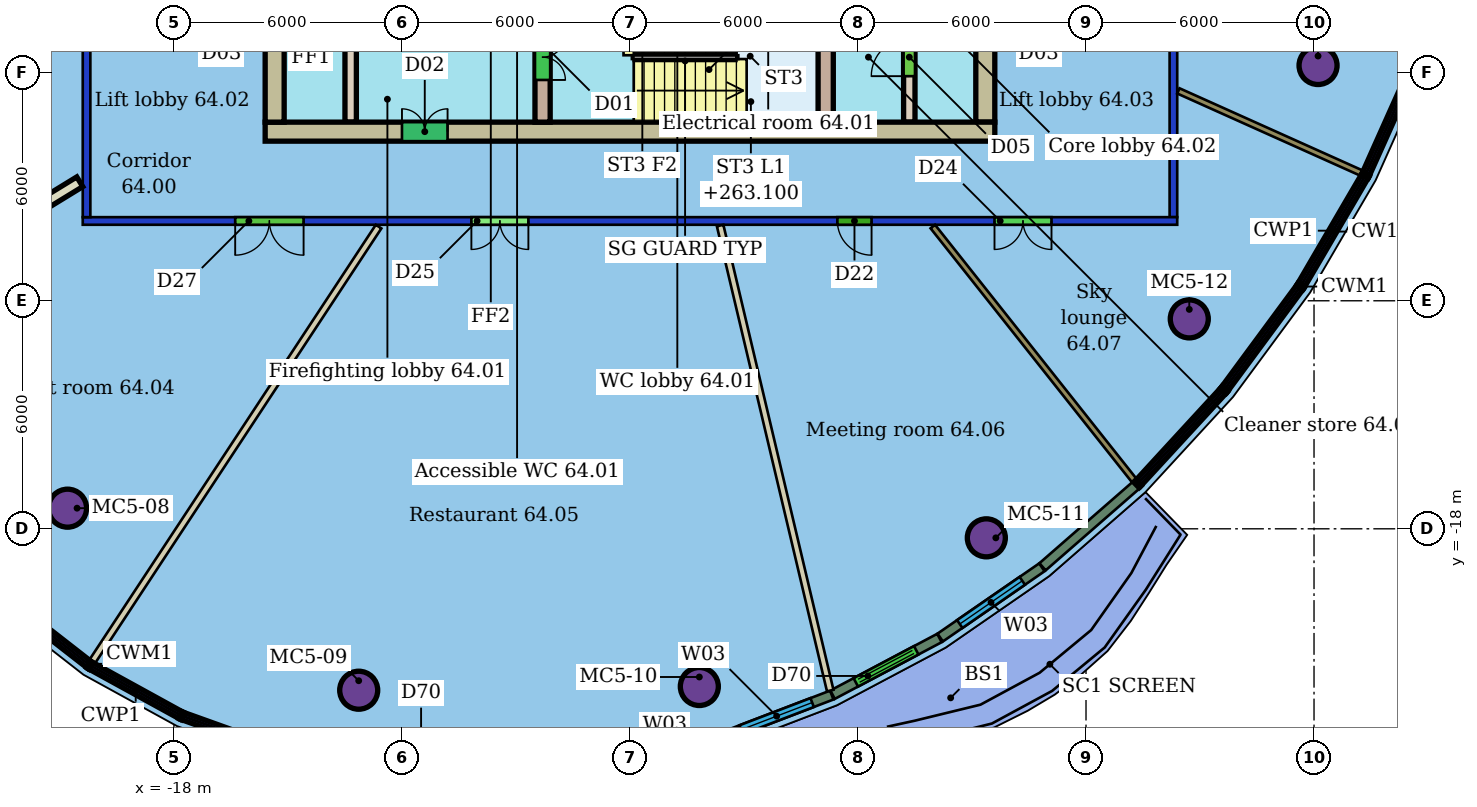
"""IFC4 building model, lengths in metres.
Left out: names, types, materials, properties, quantities, classifications, styles, units other than length and angle.
Written with IfcOpenShell. Run it as: python <this file> out.ifc"""

import sys

from ifc_helpers import new_model, si_unit, direction, frame, frame_2d, origin, origin_2d, place, context, subcontext, project, spatial, rectangle, hollow_circle, extrude, element, fill, save


model = new_model("IFC4")
c1 = context("Model", 3, precision=1e-05, world=origin(), true_north=direction((0.0, 1.0)))
c2 = subcontext(c1, "Body", "Model", "MODEL_VIEW")
j1 = project(units=[si_unit("LENGTHUNIT", "METRE"), si_unit("PLANEANGLEUNIT", "RADIAN")], contexts=[c1])
p1 = place(None, origin())
s1 = spatial("IfcSite", under=j1, at=p1, CompositionType="ELEMENT")
p2 = place(p1, origin())
s2 = spatial("IfcBuilding", under=s1, at=p2, CompositionType="ELEMENT")
p3 = place(p2, frame((0.0, 0.0, 261.3)))
s3 = spatial("IfcBuildingStorey", under=s2, at=p3, CompositionType="ELEMENT", Elevation=261.3)
for number, where, z_axis, x_axis in (
    (1, (-20.8, -17.457, 0.0), (0.0, 0.0, 1.0), (1.0, 0.0, 0.0)),
    (2, (-13.138, -22.247, 0.0), (0.0, 0.0, 1.0), (1.0, 0.0, 0.0)),
    (3, (-4.175, -22.149, 0.0), (0.0, 0.0, 1.0), (1.0, 0.0, 0.0)),
    (4, (3.377, -18.238, 0.0), (0.0, 0.0, 1.0), (1.0, 0.0, 0.0)),
    (5, (8.718, -12.477, 0.0), (0.0, 0.0, 1.0), (1.0, 0.0, 0.0)),
    (6, (12.106, -5.81, 0.0), (0.0, 0.0, 1.0), (1.0, 0.0, 0.0)),
):
    element("IfcColumn", number, at=place(p3, frame(where, z_axis=z_axis, x_axis=x_axis)), inside=s3, PredefinedType="COLUMN", context=c2, shape_type="SweptSolid", body=[
        extrude(hollow_circle(Radius=0.5, WallThickness=0.04, at=origin_2d()), origin(), (0.0, 0.0, 1.0), 3.45),
    ])
p4 = place(p3, frame((8.4, -9.9, 0.0), z_axis=(0.0, 0.0, 1.0), x_axis=(-1.0, 0.0, 0.0)))
e7 = element("IfcWall", 7, at=p4, inside=s3, PredefinedType="PARTITIONING", context=c2, shape_type="SweptSolid", body=[
    extrude(rectangle(XDim=28.8, YDim=0.2, at=frame_2d((14.4, 0.0))), origin(), (0.0, 0.0, 1.0), 3.1),
])
p5 = place(p4, frame((22.989, 0.0, 0.0)))
e8 = element("IfcOpeningElement", 8, at=p5, cuts=e7, PredefinedType="OPENING", context=c2, shape_type="SweptSolid", body=[
    extrude(rectangle(XDim=1.8, YDim=2.4, at=frame_2d((0.9, 1.2))), frame((0.0, 0.11, 0.0), z_axis=(0.0, -1.0, 0.0), x_axis=(1.0, 0.0, 0.0)), (0.0, 0.0, 1.0), 0.22),
])
p6 = place(p4, frame((17.073, 0.0, 0.0)))
e9 = element("IfcOpeningElement", 9, at=p6, cuts=e7, PredefinedType="OPENING", context=c2, shape_type="SweptSolid", body=[
    extrude(rectangle(XDim=1.5, YDim=2.4, at=frame_2d((0.75, 1.2))), frame((0.0, 0.11, 0.0), z_axis=(0.0, -1.0, 0.0), x_axis=(1.0, 0.0, 0.0)), (0.0, 0.0, 1.0), 0.22),
])
p7 = place(p4, frame((8.043, 0.0, 0.0)))
e10 = element("IfcOpeningElement", 10, at=p7, cuts=e7, PredefinedType="OPENING", context=c2, shape_type="SweptSolid", body=[
    extrude(rectangle(XDim=0.9, YDim=2.1, at=frame_2d((0.45, 1.05))), frame((0.0, 0.11, 0.0), z_axis=(0.0, -1.0, 0.0), x_axis=(1.0, 0.0, 0.0)), (0.0, 0.0, 1.0), 0.22),
])
p8 = place(p4, frame((3.308, 0.0, 0.0)))
e11 = element("IfcOpeningElement", 11, at=p8, cuts=e7, PredefinedType="OPENING", context=c2, shape_type="SweptSolid", body=[
    extrude(rectangle(XDim=1.5, YDim=2.1, at=frame_2d((0.75, 1.05))), frame((0.0, 0.11, 0.0), z_axis=(0.0, -1.0, 0.0), x_axis=(1.0, 0.0, 0.0)), (0.0, 0.0, 1.0), 0.22),
])
p9 = place(p3, frame((-20.3, -9.8, 0.0), z_axis=(0.0, 0.0, 1.0), x_axis=(0.0, 1.0, 0.0)))
e12 = element("IfcWall", 12, at=p9, inside=s3, PredefinedType="PARTITIONING", context=c2, shape_type="SweptSolid", body=[
    extrude(rectangle(XDim=19.6, YDim=0.2, at=frame_2d((9.8, 0.0))), origin(), (0.0, 0.0, 1.0), 3.1),
])
p10 = place(p9, frame((13.678, 0.0, 0.0)))
e13 = element("IfcOpeningElement", 13, at=p10, cuts=e12, PredefinedType="OPENING", context=c2, shape_type="SweptSolid", body=[
    extrude(rectangle(XDim=1.5, YDim=2.1, at=frame_2d((0.75, 1.05))), frame((0.0, 0.11, 0.0), z_axis=(0.0, -1.0, 0.0), x_axis=(1.0, 0.0, 0.0)), (0.0, 0.0, 1.0), 0.22),
])
p11 = place(p9, frame((6.822, 0.0, 0.0)))
e14 = element("IfcOpeningElement", 14, at=p11, cuts=e12, PredefinedType="OPENING", context=c2, shape_type="SweptSolid", body=[
    extrude(rectangle(XDim=1.8, YDim=2.4, at=frame_2d((0.9, 1.2))), frame((0.0, 0.11, 0.0), z_axis=(0.0, -1.0, 0.0), x_axis=(1.0, 0.0, 0.0)), (0.0, 0.0, 1.0), 0.22),
])
p12 = place(p3, frame((8.3, 9.8, 0.0), z_axis=(0.0, 0.0, 1.0), x_axis=(0.0, -1.0, 0.0)))
e15 = element("IfcWall", 15, at=p12, inside=s3, PredefinedType="PARTITIONING", context=c2, shape_type="SweptSolid", body=[
    extrude(rectangle(XDim=19.6, YDim=0.2, at=frame_2d((9.8, 0.0))), origin(), (0.0, 0.0, 1.0), 3.1),
])
p13 = place(p12, frame((9.889, 0.0, 0.0)))
e16 = element("IfcOpeningElement", 16, at=p13, cuts=e15, PredefinedType="OPENING", context=c2, shape_type="SweptSolid", body=[
    extrude(rectangle(XDim=1.8, YDim=2.1, at=frame_2d((0.9, 1.05))), frame((0.0, 0.11, 0.0), z_axis=(0.0, -1.0, 0.0), x_axis=(1.0, 0.0, 0.0)), (0.0, 0.0, 1.0), 0.22),
])
p14 = place(p3, frame((-27.006, -12.867, 0.0), z_axis=(0.0, 0.0, 1.0), x_axis=(0.852737367146, 0.522339911047, 0.0)))
e17 = element("IfcWall", 17, at=p14, inside=s3, PredefinedType="PARTITIONING", context=c2, shape_type="SweptSolid", body=[
    extrude(rectangle(XDim=7.655, YDim=0.3, at=frame_2d((3.827, 0.0))), origin(), (0.0, 0.0, 1.0), 3.45),
])
p15 = place(p3, frame((-20.146, -21.485, 0.0), z_axis=(0.0, 0.0, 1.0), x_axis=(0.549897752102, 0.835231981089, 0.0)))
e18 = element("IfcWall", 18, at=p15, inside=s3, PredefinedType="PARTITIONING", context=c2, shape_type="SweptSolid", body=[
    extrude(rectangle(XDim=13.694, YDim=0.175, at=frame_2d((6.847, 0.0))), origin(), (0.0, 0.0, 1.0), 3.45),
])
p16 = place(p3, frame((-0.731, -22.257, 0.0), z_axis=(0.0, 0.0, 1.0), x_axis=(-0.23038317053, 0.973099992157, 0.0)))
e19 = element("IfcWall", 19, at=p16, inside=s3, PredefinedType="PARTITIONING", context=c2, shape_type="SweptSolid", body=[
    extrude(rectangle(XDim=12.574, YDim=0.175, at=frame_2d((6.287, 0.0))), origin(), (0.0, 0.0, 1.0), 3.45),
])
p17 = place(p3, frame((7.269, -16.73, 0.0), z_axis=(0.0, 0.0, 1.0), x_axis=(-0.62140501057, 0.783489510356, 0.0)))
e20 = element("IfcWall", 20, at=p17, inside=s3, PredefinedType="PARTITIONING", context=c2, shape_type="SweptSolid", body=[
    extrude(rectangle(XDim=8.53, YDim=0.15, at=frame_2d((4.265, 0.0))), origin(), (0.0, 0.0, 1.0), 3.45),
])
p18 = place(p3, frame((13.243, -8.637, 0.0), z_axis=(0.0, 0.0, 1.0), x_axis=(-0.912328117743, 0.409459894954, 0.0)))
e21 = element("IfcWall", 21, at=p18, inside=s3, PredefinedType="PARTITIONING", context=c2, shape_type="SweptSolid", body=[
    extrude(rectangle(XDim=5.274, YDim=0.15, at=frame_2d((2.637, 0.0))), origin(), (0.0, 0.0, 1.0), 3.45),
])
p19 = place(p3, frame((-3.591, -23.484, 0.0), z_axis=(0.0, 0.0, 1.0), x_axis=(0.93395615703, 0.357387600156, 0.0)))
e22 = element("IfcWall", 22, at=p19, inside=s3, PredefinedType="SOLIDWALL", context=c2, shape_type="SweptSolid", body=[
    extrude(rectangle(XDim=3.105, YDim=0.25, at=frame_2d((1.553, 0.0))), origin(), (0.0, 0.0, 1.0), 3.15),
])
p20 = place(p19, frame((0.553, 0.0, 0.9)))
e23 = element("IfcOpeningElement", 23, at=p20, cuts=e22, PredefinedType="OPENING", context=c2, shape_type="SweptSolid", body=[
    extrude(rectangle(XDim=2.0, YDim=2.1, at=frame_2d((1.0, 1.05))), frame((0.0, 0.135, 0.0), z_axis=(0.0, -1.0, 0.0), x_axis=(1.0, 0.0, 0.0)), (0.0, 0.0, 1.0), 0.27),
])
p21 = place(p3, frame((-0.669, -22.365, 0.0), z_axis=(0.0, 0.0, 1.0), x_axis=(0.883433244898, 0.468557042216, 0.0)))
e24 = element("IfcWall", 24, at=p21, inside=s3, PredefinedType="SOLIDWALL", context=c2, shape_type="SweptSolid", body=[
    extrude(rectangle(XDim=3.184, YDim=0.25, at=frame_2d((1.592, 0.0))), origin(), (0.0, 0.0, 1.0), 3.15),
])
p22 = place(p21, frame((0.692, 0.0, 0.0)))
e25 = element("IfcOpeningElement", 25, at=p22, cuts=e24, PredefinedType="OPENING", context=c2, shape_type="SweptSolid", body=[
    extrude(rectangle(XDim=1.8, YDim=2.4, at=frame_2d((0.9, 1.2))), frame((0.0, 0.135, 0.0), z_axis=(0.0, -1.0, 0.0), x_axis=(1.0, 0.0, 0.0)), (0.0, 0.0, 1.0), 0.27),
])
p23 = place(p3, frame((2.163, -20.862, 0.0), z_axis=(0.0, 0.0, 1.0), x_axis=(0.822813315807, 0.568311751885, 0.0)))
e26 = element("IfcWall", 26, at=p23, inside=s3, PredefinedType="SOLIDWALL", context=c2, shape_type="SweptSolid", body=[
    extrude(rectangle(XDim=3.252, YDim=0.25, at=frame_2d((1.626, 0.0))), origin(), (0.0, 0.0, 1.0), 3.15),
])
p24 = place(p23, frame((0.626, 0.0, 0.9)))
e27 = element("IfcOpeningElement", 27, at=p24, cuts=e26, PredefinedType="OPENING", context=c2, shape_type="SweptSolid", body=[
    extrude(rectangle(XDim=2.0, YDim=2.1, at=frame_2d((1.0, 1.05))), frame((0.0, 0.135, 0.0), z_axis=(0.0, -1.0, 0.0), x_axis=(1.0, 0.0, 0.0)), (0.0, 0.0, 1.0), 0.27),
])
p25 = place(p3, frame((4.856, -19.0, 0.0), z_axis=(0.0, 0.0, 1.0), x_axis=(0.753618743279, 0.657311790385, 0.0)))
e28 = element("IfcWall", 28, at=p25, inside=s3, PredefinedType="SOLIDWALL", context=c2, shape_type="SweptSolid", body=[
    extrude(rectangle(XDim=3.263, YDim=0.25, at=frame_2d((1.631, 0.0))), origin(), (0.0, 0.0, 1.0), 3.15),
])
p26 = place(p3, frame((-15.6, -7.55, 0.0), z_axis=(0.0, 0.0, 1.0), x_axis=(1.0, 0.0, 0.0)))
e29 = element("IfcWall", 29, at=p26, inside=s3, PredefinedType="SHEAR", context=c2, shape_type="SweptSolid", body=[
    extrude(rectangle(XDim=19.2, YDim=0.5, at=frame_2d((9.6, 0.0))), origin(), (0.0, 0.0, 1.0), 3.3),
])
p27 = place(p26, frame((3.6, 0.0, 0.0)))
e30 = element("IfcOpeningElement", 30, at=p27, cuts=e29, PredefinedType="OPENING", context=c2, shape_type="SweptSolid", body=[
    extrude(rectangle(XDim=1.2, YDim=2.1, at=frame_2d((0.6, 1.05))), frame((0.0, 0.26, 0.0), z_axis=(0.0, -1.0, 0.0), x_axis=(1.0, 0.0, 0.0)), (0.0, 0.0, 1.0), 0.52),
])
p28 = place(p3, frame((-15.35, 7.3, 0.0), z_axis=(0.0, 0.0, 1.0), x_axis=(0.0, -1.0, 0.0)))
e31 = element("IfcWall", 31, at=p28, inside=s3, PredefinedType="SHEAR", context=c2, shape_type="SweptSolid", body=[
    extrude(rectangle(XDim=14.6, YDim=0.5, at=frame_2d((7.3, 0.0))), origin(), (0.0, 0.0, 1.0), 3.3),
])
p29 = place(p28, frame((10.6, 0.0, 0.0)))
e32 = element("IfcOpeningElement", 32, at=p29, cuts=e31, PredefinedType="OPENING", context=c2, shape_type="SweptSolid", body=[
    extrude(rectangle(XDim=1.2, YDim=2.1, at=frame_2d((0.6, 1.05))), frame((0.0, 0.26, 0.0), z_axis=(0.0, -1.0, 0.0), x_axis=(1.0, 0.0, 0.0)), (0.0, 0.0, 1.0), 0.52),
])
p30 = place(p28, frame((2.8, 0.0, 0.0)))
e33 = element("IfcOpeningElement", 33, at=p30, cuts=e31, PredefinedType="OPENING", context=c2, shape_type="SweptSolid", body=[
    extrude(rectangle(XDim=1.2, YDim=2.1, at=frame_2d((0.6, 1.05))), frame((0.0, 0.26, 0.0), z_axis=(0.0, -1.0, 0.0), x_axis=(1.0, 0.0, 0.0)), (0.0, 0.0, 1.0), 0.52),
])
p31 = place(p3, frame((3.35, -7.3, 0.0), z_axis=(0.0, 0.0, 1.0), x_axis=(0.0, 1.0, 0.0)))
e34 = element("IfcWall", 34, at=p31, inside=s3, PredefinedType="SHEAR", context=c2, shape_type="SweptSolid", body=[
    extrude(rectangle(XDim=14.6, YDim=0.5, at=frame_2d((7.3, 0.0))), origin(), (0.0, 0.0, 1.0), 3.3),
])
p32 = place(p31, frame((2.8, 0.0, 0.0)))
e35 = element("IfcOpeningElement", 35, at=p32, cuts=e34, PredefinedType="OPENING", context=c2, shape_type="SweptSolid", body=[
    extrude(rectangle(XDim=1.2, YDim=2.1, at=frame_2d((0.6, 1.05))), frame((0.0, 0.26, 0.0), z_axis=(0.0, -1.0, 0.0), x_axis=(1.0, 0.0, 0.0)), (0.0, 0.0, 1.0), 0.52),
])
p33 = place(p31, frame((10.6, 0.0, 0.0)))
e36 = element("IfcOpeningElement", 36, at=p33, cuts=e34, PredefinedType="OPENING", context=c2, shape_type="SweptSolid", body=[
    extrude(rectangle(XDim=1.2, YDim=2.1, at=frame_2d((0.6, 1.05))), frame((0.0, 0.26, 0.0), z_axis=(0.0, -1.0, 0.0), x_axis=(1.0, 0.0, 0.0)), (0.0, 0.0, 1.0), 0.52),
])
p34 = place(p3, frame((-13.35, 7.3, 0.0), z_axis=(0.0, 0.0, 1.0), x_axis=(0.0, -1.0, 0.0)))
e37 = element("IfcWall", 37, at=p34, inside=s3, PredefinedType="SHEAR", context=c2, shape_type="SweptSolid", body=[
    extrude(rectangle(XDim=14.6, YDim=0.3, at=frame_2d((7.3, 0.0))), origin(), (0.0, 0.0, 1.0), 3.3),
])
p35 = place(p34, frame((6.55, 0.0, 0.0)))
e38 = element("IfcOpeningElement", 38, at=p35, cuts=e37, PredefinedType="OPENING", context=c2, shape_type="SweptSolid", body=[
    extrude(rectangle(XDim=1.5, YDim=2.1, at=frame_2d((0.75, 1.05))), frame((0.0, 0.16, 0.0), z_axis=(0.0, -1.0, 0.0), x_axis=(1.0, 0.0, 0.0)), (0.0, 0.0, 1.0), 0.32),
])
p36 = place(p3, frame((1.35, -7.3, 0.0), z_axis=(0.0, 0.0, 1.0), x_axis=(0.0, 1.0, 0.0)))
e39 = element("IfcWall", 39, at=p36, inside=s3, PredefinedType="SHEAR", context=c2, shape_type="SweptSolid", body=[
    extrude(rectangle(XDim=14.6, YDim=0.3, at=frame_2d((7.3, 0.0))), origin(), (0.0, 0.0, 1.0), 3.3),
])
p37 = place(p36, frame((1.21, 0.0, 0.0)))
e40 = element("IfcOpeningElement", 40, at=p37, cuts=e39, PredefinedType="OPENING", context=c2, shape_type="SweptSolid", body=[
    extrude(rectangle(XDim=1.0, YDim=2.1, at=frame_2d((0.5, 1.05))), frame((0.0, 0.16, 0.0), z_axis=(0.0, -1.0, 0.0), x_axis=(1.0, 0.0, 0.0)), (0.0, 0.0, 1.0), 0.32),
])
p38 = place(p36, frame((6.55, 0.0, 0.0)))
e41 = element("IfcOpeningElement", 41, at=p38, cuts=e39, PredefinedType="OPENING", context=c2, shape_type="SweptSolid", body=[
    extrude(rectangle(XDim=1.5, YDim=2.1, at=frame_2d((0.75, 1.05))), frame((0.0, 0.16, 0.0), z_axis=(0.0, -1.0, 0.0), x_axis=(1.0, 0.0, 0.0)), (0.0, 0.0, 1.0), 0.32),
])
p39 = place(p3, frame((-8.3, -3.88, 0.0), z_axis=(0.0, 0.0, 1.0), x_axis=(0.0, -1.0, 0.0)))
e42 = element("IfcWall", 42, at=p39, inside=s3, PredefinedType="SHEAR", context=c2, shape_type="SweptSolid", body=[
    extrude(rectangle(XDim=3.42, YDim=0.4, at=frame_2d((1.71, 0.0))), origin(), (0.0, 0.0, 1.0), 3.3),
])
p40 = place(p39, frame((1.11, 0.0, 0.0)))
e43 = element("IfcOpeningElement", 43, at=p40, cuts=e42, PredefinedType="OPENING", context=c2, shape_type="SweptSolid", body=[
    extrude(rectangle(XDim=1.2, YDim=2.1, at=frame_2d((0.6, 1.05))), frame((0.0, 0.21, 0.0), z_axis=(0.0, -1.0, 0.0), x_axis=(1.0, 0.0, 0.0)), (0.0, 0.0, 1.0), 0.42),
])
p41 = place(p3, frame((-0.85, -3.88, 0.0), z_axis=(0.0, 0.0, 1.0), x_axis=(0.0, -1.0, 0.0)))
e44 = element("IfcWall", 44, at=p41, inside=s3, PredefinedType="SHEAR", context=c2, shape_type="SweptSolid", body=[
    extrude(rectangle(XDim=3.42, YDim=0.4, at=frame_2d((1.71, 0.0))), origin(), (0.0, 0.0, 1.0), 3.3),
])
p42 = place(p5, origin())
e45 = element("IfcDoor", 45, at=p42, inside=s3, OperationType="DOUBLE_DOOR_SINGLE_SWING", PredefinedType="DOOR", context=c2, shape_type="SweptSolid", body=[
    extrude(rectangle(XDim=1.8, YDim=2.4, at=frame_2d((0.9, 1.2))), frame((0.0, 0.025, 0.0), z_axis=(0.0, -1.0, 0.0), x_axis=(1.0, 0.0, 0.0)), (0.0, 0.0, 1.0), 0.05),
])
fill(e8, e45)
p43 = place(p6, origin())
e46 = element("IfcDoor", 46, at=p43, inside=s3, OperationType="DOUBLE_DOOR_SINGLE_SWING", PredefinedType="DOOR", context=c2, shape_type="SweptSolid", body=[
    extrude(rectangle(XDim=1.5, YDim=2.4, at=frame_2d((0.75, 1.2))), frame((0.0, 0.025, 0.0), z_axis=(0.0, -1.0, 0.0), x_axis=(1.0, 0.0, 0.0)), (0.0, 0.0, 1.0), 0.05),
])
fill(e9, e46)
p44 = place(p7, origin())
e47 = element("IfcDoor", 47, at=p44, inside=s3, OperationType="SINGLE_SWING_LEFT", PredefinedType="DOOR", context=c2, shape_type="SweptSolid", body=[
    extrude(rectangle(XDim=0.9, YDim=2.1, at=frame_2d((0.45, 1.05))), frame((0.0, 0.025, 0.0), z_axis=(0.0, -1.0, 0.0), x_axis=(1.0, 0.0, 0.0)), (0.0, 0.0, 1.0), 0.05),
])
fill(e10, e47)
p45 = place(p8, origin())
e48 = element("IfcDoor", 48, at=p45, inside=s3, OperationType="DOUBLE_DOOR_SINGLE_SWING", PredefinedType="DOOR", context=c2, shape_type="SweptSolid", body=[
    extrude(rectangle(XDim=1.5, YDim=2.1, at=frame_2d((0.75, 1.05))), frame((0.0, 0.025, 0.0), z_axis=(0.0, -1.0, 0.0), x_axis=(1.0, 0.0, 0.0)), (0.0, 0.0, 1.0), 0.05),
])
fill(e11, e48)
p46 = place(p20, origin())
e49 = element("IfcWindow", 49, at=p46, inside=s3, PartitioningType="SINGLE_PANEL", PredefinedType="WINDOW", context=c2, shape_type="SweptSolid", body=[
    extrude(rectangle(XDim=2.0, YDim=2.1, at=frame_2d((1.0, 1.05))), frame((0.0, 0.03, 0.0), z_axis=(0.0, -1.0, 0.0), x_axis=(1.0, 0.0, 0.0)), (0.0, 0.0, 1.0), 0.06),
])
fill(e23, e49)
p47 = place(p22, origin())
e50 = element("IfcDoor", 50, at=p47, inside=s3, OperationType="DOUBLE_DOOR_SLIDING", PredefinedType="DOOR", context=c2, shape_type="SweptSolid", body=[
    extrude(rectangle(XDim=1.8, YDim=2.4, at=frame_2d((0.9, 1.2))), frame((0.0, 0.025, 0.0), z_axis=(0.0, -1.0, 0.0), x_axis=(1.0, 0.0, 0.0)), (0.0, 0.0, 1.0), 0.05),
])
fill(e25, e50)
p48 = place(p24, origin())
e51 = element("IfcWindow", 51, at=p48, inside=s3, PartitioningType="SINGLE_PANEL", PredefinedType="WINDOW", context=c2, shape_type="SweptSolid", body=[
    extrude(rectangle(XDim=2.0, YDim=2.1, at=frame_2d((1.0, 1.05))), frame((0.0, 0.03, 0.0), z_axis=(0.0, -1.0, 0.0), x_axis=(1.0, 0.0, 0.0)), (0.0, 0.0, 1.0), 0.06),
])
fill(e27, e51)
p49 = place(p27, origin())
e52 = element("IfcDoor", 52, at=p49, inside=s3, OperationType="DOUBLE_DOOR_SINGLE_SWING", PredefinedType="NOTDEFINED", context=c2, shape_type="SweptSolid", body=[
    extrude(rectangle(XDim=1.2, YDim=2.1, at=frame_2d((0.6, 1.05))), frame((0.0, 0.025, 0.0), z_axis=(0.0, -1.0, 0.0), x_axis=(1.0, 0.0, 0.0)), (0.0, 0.0, 1.0), 0.05),
])
fill(e30, e52)
p50 = place(p37, origin())
e53 = element("IfcDoor", 53, at=p50, inside=s3, OperationType="SINGLE_SWING_LEFT", PredefinedType="NOTDEFINED", context=c2, shape_type="SweptSolid", body=[
    extrude(rectangle(XDim=1.0, YDim=2.1, at=frame_2d((0.5, 1.05))), frame((0.0, 0.025, 0.0), z_axis=(0.0, -1.0, 0.0), x_axis=(1.0, 0.0, 0.0)), (0.0, 0.0, 1.0), 0.05),
])
fill(e40, e53)
p51 = place(p40, origin())
e54 = element("IfcDoor", 54, at=p51, inside=s3, OperationType="DOUBLE_DOOR_SINGLE_SWING", PredefinedType="NOTDEFINED", context=c2, shape_type="SweptSolid", body=[
    extrude(rectangle(XDim=1.2, YDim=2.1, at=frame_2d((0.6, 1.05))), frame((0.0, 0.025, 0.0), z_axis=(0.0, -1.0, 0.0), x_axis=(1.0, 0.0, 0.0)), (0.0, 0.0, 1.0), 0.05),
])
fill(e43, e54)
save(model, sys.argv[1])
